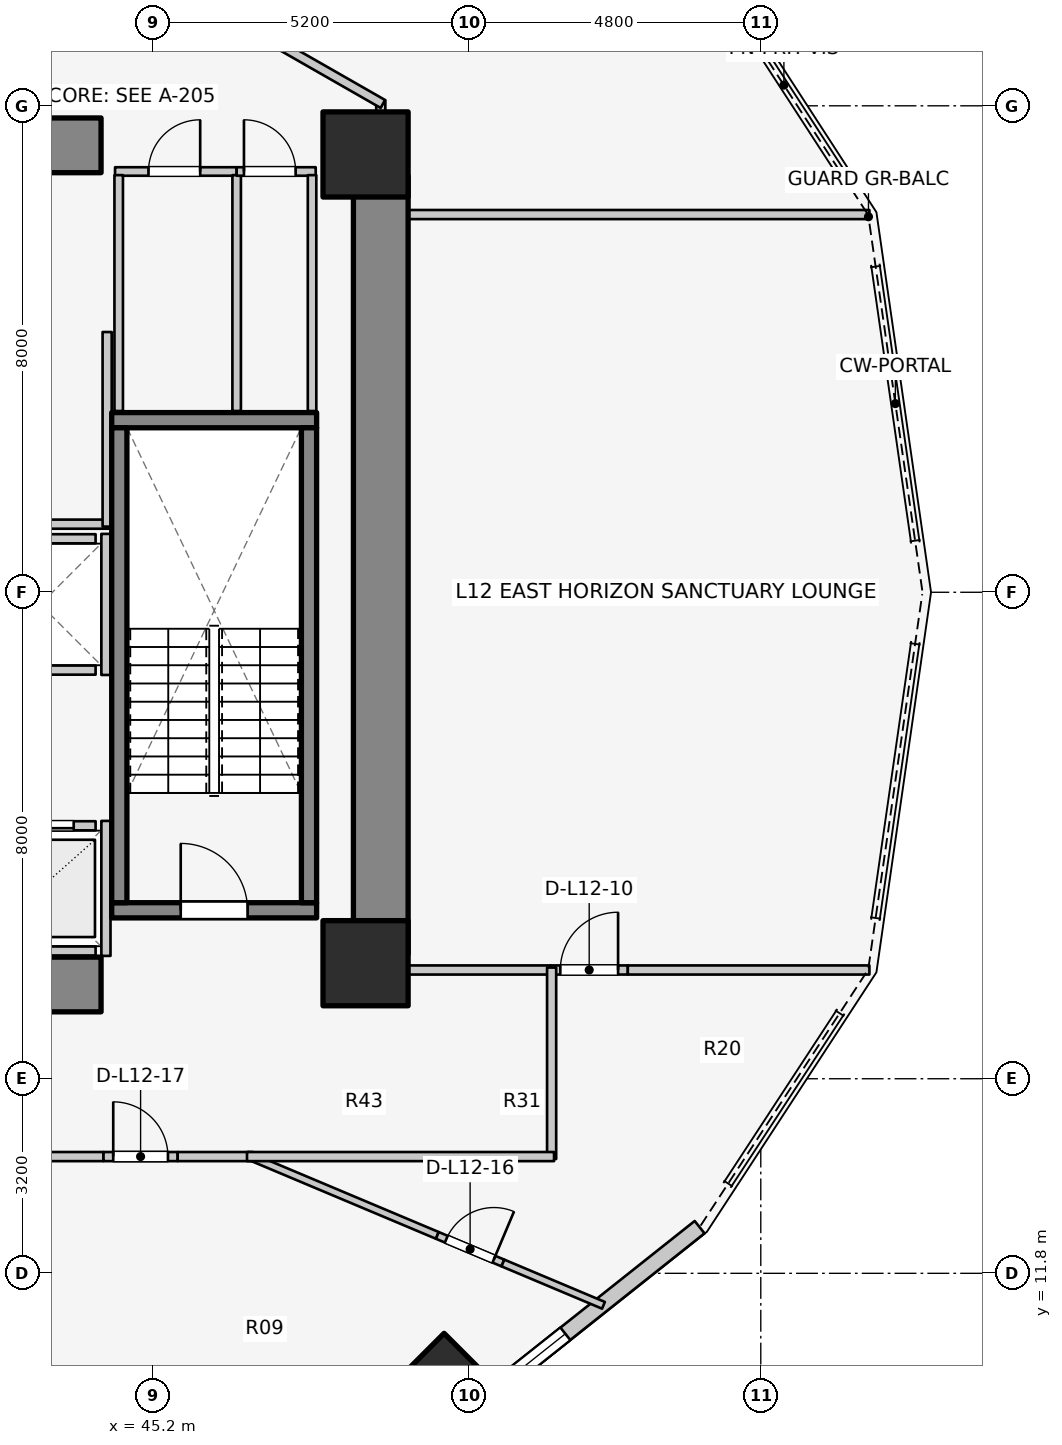
"""IFC4 building model, lengths in metres.
Left out: names, types, materials, properties, quantities, classifications, styles, units other than length and angle.
Written with IfcOpenShell. Run it as: python <this file> out.ifc"""

import sys

from ifc_helpers import new_model, si_unit, direction, frame, frame_2d, origin, origin_2d, place, context, subcontext, project, spatial, rectangle, extrude, element, fill, save


model = new_model("IFC4")
c1 = context("Model", 3, precision=1e-05, world=origin(), true_north=direction((0.0, 1.0)))
c2 = subcontext(c1, "Body", "Model", "MODEL_VIEW")
j1 = project(units=[si_unit("LENGTHUNIT", "METRE"), si_unit("PLANEANGLEUNIT", "RADIAN")], contexts=[c1])
p1 = place(None, origin())
s1 = spatial("IfcSite", under=j1, at=p1, CompositionType="ELEMENT")
p2 = place(p1, origin())
s2 = spatial("IfcBuilding", under=s1, at=p2, CompositionType="ELEMENT")
p3 = place(p2, frame((0.0, 0.0, 43.1)))
s3 = spatial("IfcBuildingStorey", under=s2, at=p3, CompositionType="ELEMENT", Elevation=43.1)
p4 = place(p3, frame((48.95, 17.05, 0.0), z_axis=(0.0, 0.0, 1.0), x_axis=(0.0, 1.0, 0.0)))
e1 = element("IfcWall", 1, at=p4, inside=s3, PredefinedType="SHEAR", context=c2, shape_type="SweptSolid", body=[
    extrude(rectangle(XDim=12.8, YDim=0.9, at=frame_2d((6.4, 0.0))), origin(), (0.0, 0.0, 1.0), 3.1),
])
for number, where, z_axis, x_axis in (
    (2, (39.85, 16.55, 0.0), (0.0, 0.0, 1.0), (1.0, 0.0, 0.0)),
    (3, (39.85, 30.35, 0.0), (0.0, 0.0, 1.0), (1.0, 0.0, 0.0)),
):
    element("IfcWall", number, at=place(p3, frame(where, z_axis=z_axis, x_axis=x_axis)), inside=s3, PredefinedType="SHEAR", context=c2, shape_type="SweptSolid", body=[
        extrude(rectangle(XDim=4.5, YDim=0.9, at=frame_2d((2.25, 0.0))), origin(), (0.0, 0.0, 1.0), 3.1),
    ])
p5 = place(p3, frame((44.525, 17.77, 0.0), z_axis=(0.0, 0.0, 1.0), x_axis=(1.0, 0.0, 0.0)))
e4 = element("IfcWall", 4, at=p5, inside=s3, PredefinedType="SOLIDWALL", context=c2, shape_type="SweptSolid", body=[
    extrude(rectangle(XDim=3.37, YDim=0.25, at=frame_2d((1.685, 0.0))), origin(), (0.0, 0.0, 1.0), 3.1),
])
p6 = place(p5, frame((1.135, 0.0, 0.0)))
e5 = element("IfcOpeningElement", 5, at=p6, cuts=e4, PredefinedType="OPENING", context=c2, shape_type="SweptSolid", body=[
    extrude(rectangle(XDim=1.1, YDim=2.1, at=frame_2d((0.55, 1.05))), frame((0.0, 0.135, 0.0), z_axis=(0.0, -1.0, 0.0), x_axis=(1.0, 0.0, 0.0)), (0.0, 0.0, 1.0), 0.27),
])
p7 = place(p3, frame((44.525, 25.83, 0.0), z_axis=(0.0, 0.0, 1.0), x_axis=(1.0, 0.0, 0.0)))
e6 = element("IfcWall", 6, at=p7, inside=s3, PredefinedType="SOLIDWALL", context=c2, shape_type="SweptSolid", body=[
    extrude(rectangle(XDim=3.37, YDim=0.25, at=frame_2d((1.685, 0.0))), origin(), (0.0, 0.0, 1.0), 3.1),
])
for number, where, z_axis, x_axis in (
    (7, (44.65, 17.895, 0.0), (0.0, 0.0, 1.0), (0.0, 1.0, 0.0)),
    (8, (47.77, 17.895, 0.0), (0.0, 0.0, 1.0), (0.0, 1.0, 0.0)),
):
    element("IfcWall", number, at=place(p3, frame(where, z_axis=z_axis, x_axis=x_axis)), inside=s3, PredefinedType="SOLIDWALL", context=c2, shape_type="SweptSolid", body=[
        extrude(rectangle(XDim=7.81, YDim=0.25, at=frame_2d((3.905, 0.0))), origin(), (0.0, 0.0, 1.0), 3.1),
    ])
for number, where, z_axis, x_axis in (
    (9, (48.7, 16.9, 0.0), (0.0, 0.0, 1.0), (1.0, 0.0, 0.0)),
    (10, (48.7, 30.2, 0.0), (0.0, 0.0, 1.0), (1.0, 0.0, 0.0)),
):
    element("IfcColumn", number, at=place(p3, frame(where, z_axis=z_axis, x_axis=x_axis)), inside=s3, PredefinedType="COLUMN", context=c2, shape_type="SweptSolid", body=[
        extrude(rectangle(XDim=1.4, YDim=1.4, at=origin_2d()), origin(), (0.0, 0.0, 1.0), 3.1),
    ])
p8 = place(p3, frame((49.992, 9.965, 0.0), z_axis=(0.0, 0.0, 1.0), x_axis=(0.707106781187, -0.707106781187, 0.0)))
e11 = element("IfcColumn", 11, at=p8, inside=s3, PredefinedType="COLUMN", context=c2, shape_type="SweptSolid", body=[
    extrude(rectangle(XDim=1.2, YDim=1.2, at=origin_2d()), origin(), (0.0, 0.0, 1.0), 3.1),
])
p9 = place(p3, frame((50.405, 9.55, 0.0), z_axis=(0.0, 0.0, 1.0), x_axis=(0.783123133379, 0.621866672179, 0.0)))
e12 = element("IfcWall", 12, at=p9, inside=s3, PredefinedType="STANDARD", context=c2, shape_type="SweptSolid", body=[
    extrude(rectangle(XDim=4.839, YDim=0.26, at=frame_2d((2.419, 0.0))), origin(), (0.0, 0.0, 1.0), 1.22),
])
p10 = place(p9, frame((0.819, 0.0, 0.15)))
e13 = element("IfcOpeningElement", 13, at=p10, cuts=e12, PredefinedType="OPENING", context=c2, shape_type="SweptSolid", body=[
    extrude(rectangle(XDim=1.2, YDim=0.9, at=frame_2d((0.6, 0.45))), frame((0.0, 0.14, 0.0), z_axis=(0.0, -1.0, 0.0), x_axis=(1.0, 0.0, 0.0)), (0.0, 0.0, 1.0), 0.28),
])
p11 = place(p3, frame((42.44, 19.16, 0.0), z_axis=(0.0, 0.0, 1.0), x_axis=(1.0, 0.0, 0.0)))
e14 = element("IfcWall", 14, at=p11, inside=s3, PredefinedType="SOLIDWALL", context=c2, shape_type="SweptSolid", body=[
    extrude(rectangle(XDim=1.82, YDim=0.15, at=frame_2d((0.91, 0.0))), origin(), (0.0, 0.0, 1.0), 2.575),
])
p12 = place(p11, frame((0.36, 0.0, 0.0)))
e15 = element("IfcOpeningElement", 15, at=p12, cuts=e14, PredefinedType="OPENING", context=c2, shape_type="SweptSolid", body=[
    extrude(rectangle(XDim=1.1, YDim=2.1, at=frame_2d((0.55, 1.05))), frame((0.0, 0.085, 0.0), z_axis=(0.0, -1.0, 0.0), x_axis=(1.0, 0.0, 0.0)), (0.0, 0.0, 1.0), 0.17),
])
p13 = place(p3, frame((42.44, 17.1, 0.0), z_axis=(0.0, 0.0, 1.0), x_axis=(1.0, 0.0, 0.0)))
e16 = element("IfcWall", 16, at=p13, inside=s3, PredefinedType="SOLIDWALL", context=c2, shape_type="SweptSolid", body=[
    extrude(rectangle(XDim=1.82, YDim=0.15, at=frame_2d((0.91, 0.0))), origin(), (0.0, 0.0, 1.0), 2.575),
])
p14 = place(p3, frame((44.43, 17.02, 0.0), z_axis=(0.0, 0.0, 1.0), x_axis=(0.0, 1.0, 0.0)))
e17 = element("IfcWall", 17, at=p14, inside=s3, PredefinedType="SOLIDWALL", context=c2, shape_type="SweptSolid", body=[
    extrude(rectangle(XDim=2.22, YDim=0.15, at=frame_2d((1.11, 0.0))), origin(), (0.0, 0.0, 1.0), 2.12),
])
for number, where, z_axis, x_axis in (
    (18, (42.44, 21.72, 0.0), (0.0, 0.0, 1.0), (1.0, 0.0, 0.0)),
    (19, (42.44, 23.88, 0.0), (0.0, 0.0, 1.0), (1.0, 0.0, 0.0)),
):
    element("IfcWall", number, at=place(p3, frame(where, z_axis=z_axis, x_axis=x_axis)), inside=s3, PredefinedType="SOLIDWALL", context=c2, shape_type="SweptSolid", body=[
        extrude(rectangle(XDim=1.82, YDim=0.15, at=frame_2d((0.91, 0.0))), origin(), (0.0, 0.0, 1.0), 2.575),
    ])
p15 = place(p3, frame((44.43, 21.64, 0.0), z_axis=(0.0, 0.0, 1.0), x_axis=(0.0, 1.0, 0.0)))
e20 = element("IfcWall", 20, at=p15, inside=s3, PredefinedType="SOLIDWALL", context=c2, shape_type="SweptSolid", body=[
    extrude(rectangle(XDim=2.32, YDim=0.15, at=frame_2d((1.16, 0.0))), origin(), (0.0, 0.0, 1.0), 2.575),
])
p16 = place(p3, frame((39.4, 24.12, 0.0), z_axis=(0.0, 0.0, 1.0), x_axis=(1.0, 0.0, 0.0)))
e21 = element("IfcWall", 21, at=p16, inside=s3, PredefinedType="PARTITIONING", context=c2, shape_type="SweptSolid", body=[
    extrude(rectangle(XDim=5.08, YDim=0.15, at=frame_2d((2.54, 0.0))), origin(), (0.0, 0.0, 1.0), 2.12),
])
p17 = place(p3, frame((44.45, 24.08, 0.0), z_axis=(0.0, 0.0, 1.0), x_axis=(0.0, 1.0, 0.0)))
e22 = element("IfcWall", 22, at=p17, inside=s3, PredefinedType="PARTITIONING", context=c2, shape_type="SweptSolid", body=[
    extrude(rectangle(XDim=3.2, YDim=0.15, at=frame_2d((1.6, 0.0))), origin(), (0.0, 0.0, 1.0), 2.575),
])
p18 = place(p3, frame((44.58, 29.92, 0.0), z_axis=(0.0, 0.0, 1.0), x_axis=(1.0, 0.0, 0.0)))
e23 = element("IfcWall", 23, at=p18, inside=s3, PredefinedType="PLUMBINGWALL", context=c2, shape_type="SweptSolid", body=[
    extrude(rectangle(XDim=2.0, YDim=0.14, at=frame_2d((1.0, 0.0))), origin(), (0.0, 0.0, 1.0), 2.575),
])
p19 = place(p18, frame((0.55, 0.0, 0.0)))
e24 = element("IfcOpeningElement", 24, at=p19, cuts=e23, PredefinedType="OPENING", context=c2, shape_type="SweptSolid", body=[
    extrude(rectangle(XDim=0.85, YDim=2.05, at=frame_2d((0.425, 1.025))), frame((0.0, 0.08, 0.0), z_axis=(0.0, -1.0, 0.0), x_axis=(1.0, 0.0, 0.0)), (0.0, 0.0, 1.0), 0.16),
])
for number, where, z_axis, x_axis in (
    (25, (44.64, 25.98, 0.0), (0.0, 0.0, 1.0), (0.0, 1.0, 0.0)),
    (26, (46.58, 25.98, 0.0), (0.0, 0.0, 1.0), (0.0, 1.0, 0.0)),
):
    element("IfcWall", number, at=place(p3, frame(where, z_axis=z_axis, x_axis=x_axis)), inside=s3, PredefinedType="PLUMBINGWALL", context=c2, shape_type="SweptSolid", body=[
        extrude(rectangle(XDim=3.88, YDim=0.14, at=frame_2d((1.94, 0.0))), origin(), (0.0, 0.0, 1.0), 2.575),
    ])
p20 = place(p3, frame((46.58, 29.92, 0.0), z_axis=(0.0, 0.0, 1.0), x_axis=(1.0, 0.0, 0.0)))
e27 = element("IfcWall", 27, at=p20, inside=s3, PredefinedType="PLUMBINGWALL", context=c2, shape_type="SweptSolid", body=[
    extrude(rectangle(XDim=1.3, YDim=0.14, at=frame_2d((0.65, 0.0))), origin(), (0.0, 0.0, 1.0), 2.575),
])
p21 = place(p20, frame((0.12, 0.0, 0.0)))
e28 = element("IfcOpeningElement", 28, at=p21, cuts=e27, PredefinedType="OPENING", context=c2, shape_type="SweptSolid", body=[
    extrude(rectangle(XDim=0.85, YDim=2.05, at=frame_2d((0.425, 1.025))), frame((0.0, 0.08, 0.0), z_axis=(0.0, -1.0, 0.0), x_axis=(1.0, 0.0, 0.0)), (0.0, 0.0, 1.0), 0.16),
])
p22 = place(p3, frame((47.82, 25.98, 0.0), z_axis=(0.0, 0.0, 1.0), x_axis=(0.0, 1.0, 0.0)))
e29 = element("IfcWall", 29, at=p22, inside=s3, PredefinedType="PLUMBINGWALL", context=c2, shape_type="SweptSolid", body=[
    extrude(rectangle(XDim=3.88, YDim=0.14, at=frame_2d((1.94, 0.0))), origin(), (0.0, 0.0, 1.0), 2.575),
])
p23 = place(p3, frame((48.95, 16.788, 0.0), z_axis=(0.0, 0.0, 1.0), x_axis=(1.0, 0.0, 0.0)))
e30 = element("IfcWall", 30, at=p23, inside=s3, PredefinedType="PARTITIONING", context=c2, shape_type="SweptSolid", body=[
    extrude(rectangle(XDim=2.793, YDim=0.15, at=frame_2d((1.396, 0.0))), origin(), (0.0, 0.0, 1.0), 1.22),
])
p24 = place(p3, frame((51.743, 16.788, 0.0), z_axis=(0.0, 0.0, 1.0), x_axis=(1.0, 0.0, 0.0)))
e31 = element("IfcWall", 31, at=p24, inside=s3, PredefinedType="PARTITIONING", context=c2, shape_type="SweptSolid", body=[
    extrude(rectangle(XDim=1.27, YDim=0.15, at=frame_2d((0.635, 0.0))), origin(), (0.0, 0.0, 1.0), 2.575),
])
p25 = place(p24, frame((0.16, 0.0, 0.0)))
e32 = element("IfcOpeningElement", 32, at=p25, cuts=e31, PredefinedType="OPENING", context=c2, shape_type="SweptSolid", body=[
    extrude(rectangle(XDim=0.95, YDim=2.1, at=frame_2d((0.475, 1.05))), frame((0.0, 0.085, 0.0), z_axis=(0.0, -1.0, 0.0), x_axis=(1.0, 0.0, 0.0)), (0.0, 0.0, 1.0), 0.17),
])
p26 = place(p3, frame((53.013, 16.788, 0.0), z_axis=(0.0, 0.0, 1.0), x_axis=(1.0, 0.0, 0.0)))
e33 = element("IfcWall", 33, at=p26, inside=s3, PredefinedType="PARTITIONING", context=c2, shape_type="SweptSolid", body=[
    extrude(rectangle(XDim=3.973, YDim=0.15, at=frame_2d((1.987, 0.0))), origin(), (0.0, 0.0, 1.0), 2.575),
])
p27 = place(p3, frame((48.95, 29.212, 0.0), z_axis=(0.0, 0.0, 1.0), x_axis=(1.0, 0.0, 0.0)))
e34 = element("IfcWall", 34, at=p27, inside=s3, PredefinedType="PARTITIONING", context=c2, shape_type="SweptSolid", body=[
    extrude(rectangle(XDim=8.036, YDim=0.15, at=frame_2d((4.018, 0.0))), origin(), (0.0, 0.0, 1.0), 2.575),
])
p28 = place(p3, frame((48.95, 29.8, 0.0), z_axis=(0.0, 0.0, 1.0), x_axis=(0.0, 1.0, 0.0)))
e35 = element("IfcWall", 35, at=p28, inside=s3, PredefinedType="PARTITIONING", context=c2, shape_type="SweptSolid", body=[
    extrude(rectangle(XDim=1.29, YDim=0.15, at=frame_2d((0.645, 0.0))), origin(), (0.0, 0.0, 1.0), 1.22),
])
p29 = place(p3, frame((46.757, 32.305, 0.0), z_axis=(0.0, 0.0, 1.0), x_axis=(0.867991349648, -0.496579315857, 0.0)))
e36 = element("IfcWall", 36, at=p29, inside=s3, PredefinedType="PARTITIONING", context=c2, shape_type="SweptSolid", body=[
    extrude(rectangle(XDim=2.567, YDim=0.15, at=frame_2d((1.283, 0.0))), origin(), (0.0, 0.0, 1.0), 1.22),
])
p30 = place(p3, frame((51.76, 13.68, 0.0), z_axis=(0.0, 0.0, 1.0), x_axis=(0.0, 1.0, 0.0)))
e37 = element("IfcWall", 37, at=p30, inside=s3, PredefinedType="PARTITIONING", context=c2, shape_type="SweptSolid", body=[
    extrude(rectangle(XDim=3.148, YDim=0.15, at=frame_2d((1.574, 0.0))), origin(), (0.0, 0.0, 1.0), 2.575),
])
p31 = place(p3, frame((46.754, 13.74, 0.0), z_axis=(0.0, 0.0, 1.0), x_axis=(0.921686848925, -0.387934727136, 0.0)))
e38 = element("IfcWall", 38, at=p31, inside=s3, PredefinedType="MOVABLE", context=c2, shape_type="SweptSolid", body=[
    extrude(rectangle(XDim=3.392, YDim=0.12, at=frame_2d((1.696, 0.0))), origin(), (0.0, 0.0, 1.0), 1.22),
])
p32 = place(p3, frame((49.88, 12.424, 0.0), z_axis=(0.0, 0.0, 1.0), x_axis=(0.92176888, -0.387739773384, 0.0)))
e39 = element("IfcWall", 39, at=p32, inside=s3, PredefinedType="MOVABLE", context=c2, shape_type="SweptSolid", body=[
    extrude(rectangle(XDim=1.17, YDim=0.12, at=frame_2d((0.585, 0.0))), origin(), (0.0, 0.0, 1.0), 2.11),
])
p33 = place(p32, frame((0.16, 0.0, 0.0)))
e40 = element("IfcOpeningElement", 40, at=p33, cuts=e39, PredefinedType="OPENING", context=c2, shape_type="SweptSolid", body=[
    extrude(rectangle(XDim=0.85, YDim=2.05, at=frame_2d((0.425, 1.025))), frame((0.0, 0.07, 0.0), z_axis=(0.0, -1.0, 0.0), x_axis=(1.0, 0.0, 0.0)), (0.0, 0.0, 1.0), 0.14),
])
p34 = place(p3, frame((50.959, 11.97, 0.0), z_axis=(0.0, 0.0, 1.0), x_axis=(0.921694272019, -0.387917090275, 0.0)))
e41 = element("IfcWall", 41, at=p34, inside=s3, PredefinedType="MOVABLE", context=c2, shape_type="SweptSolid", body=[
    extrude(rectangle(XDim=1.794, YDim=0.12, at=frame_2d((0.897, 0.0))), origin(), (0.0, 0.0, 1.0), 2.575),
])
p35 = place(p3, frame((39.33, 13.72, 0.0), z_axis=(0.0, 0.0, 1.0), x_axis=(1.0, 0.0, 0.0)))
e42 = element("IfcWall", 42, at=p35, inside=s3, PredefinedType="PARTITIONING", context=c2, shape_type="SweptSolid", body=[
    extrude(rectangle(XDim=5.06, YDim=0.15, at=frame_2d((2.53, 0.0))), origin(), (0.0, 0.0, 1.0), 1.957),
])
p36 = place(p3, frame((44.39, 13.72, 0.0), z_axis=(0.0, 0.0, 1.0), x_axis=(1.0, 0.0, 0.0)))
e43 = element("IfcWall", 43, at=p36, inside=s3, PredefinedType="PARTITIONING", context=c2, shape_type="SweptSolid", body=[
    extrude(rectangle(XDim=1.22, YDim=0.15, at=frame_2d((0.61, 0.0))), origin(), (0.0, 0.0, 1.0), 2.575),
])
p37 = place(p36, frame((0.16, 0.0, 0.0)))
e44 = element("IfcOpeningElement", 44, at=p37, cuts=e43, PredefinedType="OPENING", context=c2, shape_type="SweptSolid", body=[
    extrude(rectangle(XDim=0.9, YDim=2.1, at=frame_2d((0.45, 1.05))), frame((0.0, 0.085, 0.0), z_axis=(0.0, -1.0, 0.0), x_axis=(1.0, 0.0, 0.0)), (0.0, 0.0, 1.0), 0.17),
])
p38 = place(p3, frame((45.61, 13.72, 0.0), z_axis=(0.0, 0.0, 1.0), x_axis=(1.0, 0.0, 0.0)))
e45 = element("IfcWall", 45, at=p38, inside=s3, PredefinedType="PARTITIONING", context=c2, shape_type="SweptSolid", body=[
    extrude(rectangle(XDim=1.24, YDim=0.15, at=frame_2d((0.62, 0.0))), origin(), (0.0, 0.0, 1.0), 2.575),
])
p39 = place(p3, frame((46.75, 13.72, 0.0), z_axis=(0.0, 0.0, 1.0), x_axis=(1.0, 0.0, 0.0)))
e46 = element("IfcWall", 46, at=p39, inside=s3, PredefinedType="PARTITIONING", context=c2, shape_type="SweptSolid", body=[
    extrude(rectangle(XDim=5.05, YDim=0.15, at=frame_2d((2.525, 0.0))), origin(), (0.0, 0.0, 1.0), 1.22),
])
p40 = place(p3, frame((37.252, 13.09, 0.0), z_axis=(0.0, 0.0, 1.0), x_axis=(0.855817136021, -0.517278483694, 0.0)))
e47 = element("IfcWall", 47, at=p40, inside=s3, PredefinedType="PARTITIONING", context=c2, shape_type="SweptSolid", body=[
    extrude(rectangle(XDim=9.564, YDim=0.18, at=frame_2d((4.782, 0.0))), origin(), (0.0, 0.0, 1.0), 1.957),
])
p41 = place(p10, origin())
e48 = element("IfcWindow", 48, at=p41, inside=s3, PartitioningType="SINGLE_PANEL", PredefinedType="WINDOW", context=c2, shape_type="SweptSolid", body=[
    extrude(rectangle(XDim=1.2, YDim=0.9, at=frame_2d((0.6, 0.45))), frame((0.0, 0.03, 0.0), z_axis=(0.0, -1.0, 0.0), x_axis=(1.0, 0.0, 0.0)), (0.0, 0.0, 1.0), 0.06),
])
fill(e13, e48)
p42 = place(p6, origin())
e49 = element("IfcDoor", 49, at=p42, inside=s3, OperationType="SINGLE_SWING_LEFT", PredefinedType="DOOR", context=c2, shape_type="SweptSolid", body=[
    extrude(rectangle(XDim=1.1, YDim=2.1, at=frame_2d((0.55, 1.05))), frame((0.0, 0.025, 0.0), z_axis=(0.0, -1.0, 0.0), x_axis=(1.0, 0.0, 0.0)), (0.0, 0.0, 1.0), 0.05),
])
fill(e5, e49)
p43 = place(p12, origin())
e50 = element("IfcDoor", 50, at=p43, inside=s3, OperationType="DOUBLE_DOOR_SLIDING", PredefinedType="DOOR", context=c2, shape_type="SweptSolid", body=[
    extrude(rectangle(XDim=1.1, YDim=2.1, at=frame_2d((0.55, 1.05))), frame((0.0, 0.025, 0.0), z_axis=(0.0, -1.0, 0.0), x_axis=(1.0, 0.0, 0.0)), (0.0, 0.0, 1.0), 0.05),
])
fill(e15, e50)
p44 = place(p19, origin())
e51 = element("IfcDoor", 51, at=p44, inside=s3, OperationType="SINGLE_SWING_RIGHT", PredefinedType="DOOR", context=c2, shape_type="SweptSolid", body=[
    extrude(rectangle(XDim=0.85, YDim=2.05, at=frame_2d((0.425, 1.025))), frame((0.0, 0.025, 0.0), z_axis=(0.0, -1.0, 0.0), x_axis=(1.0, 0.0, 0.0)), (0.0, 0.0, 1.0), 0.05),
])
fill(e24, e51)
p45 = place(p21, origin())
e52 = element("IfcDoor", 52, at=p45, inside=s3, OperationType="SINGLE_SWING_LEFT", PredefinedType="DOOR", context=c2, shape_type="SweptSolid", body=[
    extrude(rectangle(XDim=0.85, YDim=2.05, at=frame_2d((0.425, 1.025))), frame((0.0, 0.025, 0.0), z_axis=(0.0, -1.0, 0.0), x_axis=(1.0, 0.0, 0.0)), (0.0, 0.0, 1.0), 0.05),
])
fill(e28, e52)
p46 = place(p25, origin())
e53 = element("IfcDoor", 53, at=p46, inside=s3, OperationType="SINGLE_SWING_RIGHT", PredefinedType="DOOR", context=c2, shape_type="SweptSolid", body=[
    extrude(rectangle(XDim=0.95, YDim=2.1, at=frame_2d((0.475, 1.05))), frame((0.0, 0.025, 0.0), z_axis=(0.0, -1.0, 0.0), x_axis=(1.0, 0.0, 0.0)), (0.0, 0.0, 1.0), 0.05),
])
fill(e32, e53)
p47 = place(p33, origin())
e54 = element("IfcDoor", 54, at=p47, inside=s3, OperationType="SINGLE_SWING_RIGHT", PredefinedType="DOOR", context=c2, shape_type="SweptSolid", body=[
    extrude(rectangle(XDim=0.85, YDim=2.05, at=frame_2d((0.425, 1.025))), frame((0.0, 0.025, 0.0), z_axis=(0.0, -1.0, 0.0), x_axis=(1.0, 0.0, 0.0)), (0.0, 0.0, 1.0), 0.05),
])
fill(e40, e54)
p48 = place(p37, origin())
e55 = element("IfcDoor", 55, at=p48, inside=s3, OperationType="SINGLE_SWING_LEFT", PredefinedType="DOOR", context=c2, shape_type="SweptSolid", body=[
    extrude(rectangle(XDim=0.9, YDim=2.1, at=frame_2d((0.45, 1.05))), frame((0.0, 0.025, 0.0), z_axis=(0.0, -1.0, 0.0), x_axis=(1.0, 0.0, 0.0)), (0.0, 0.0, 1.0), 0.05),
])
fill(e44, e55)
save(model, sys.argv[1])
